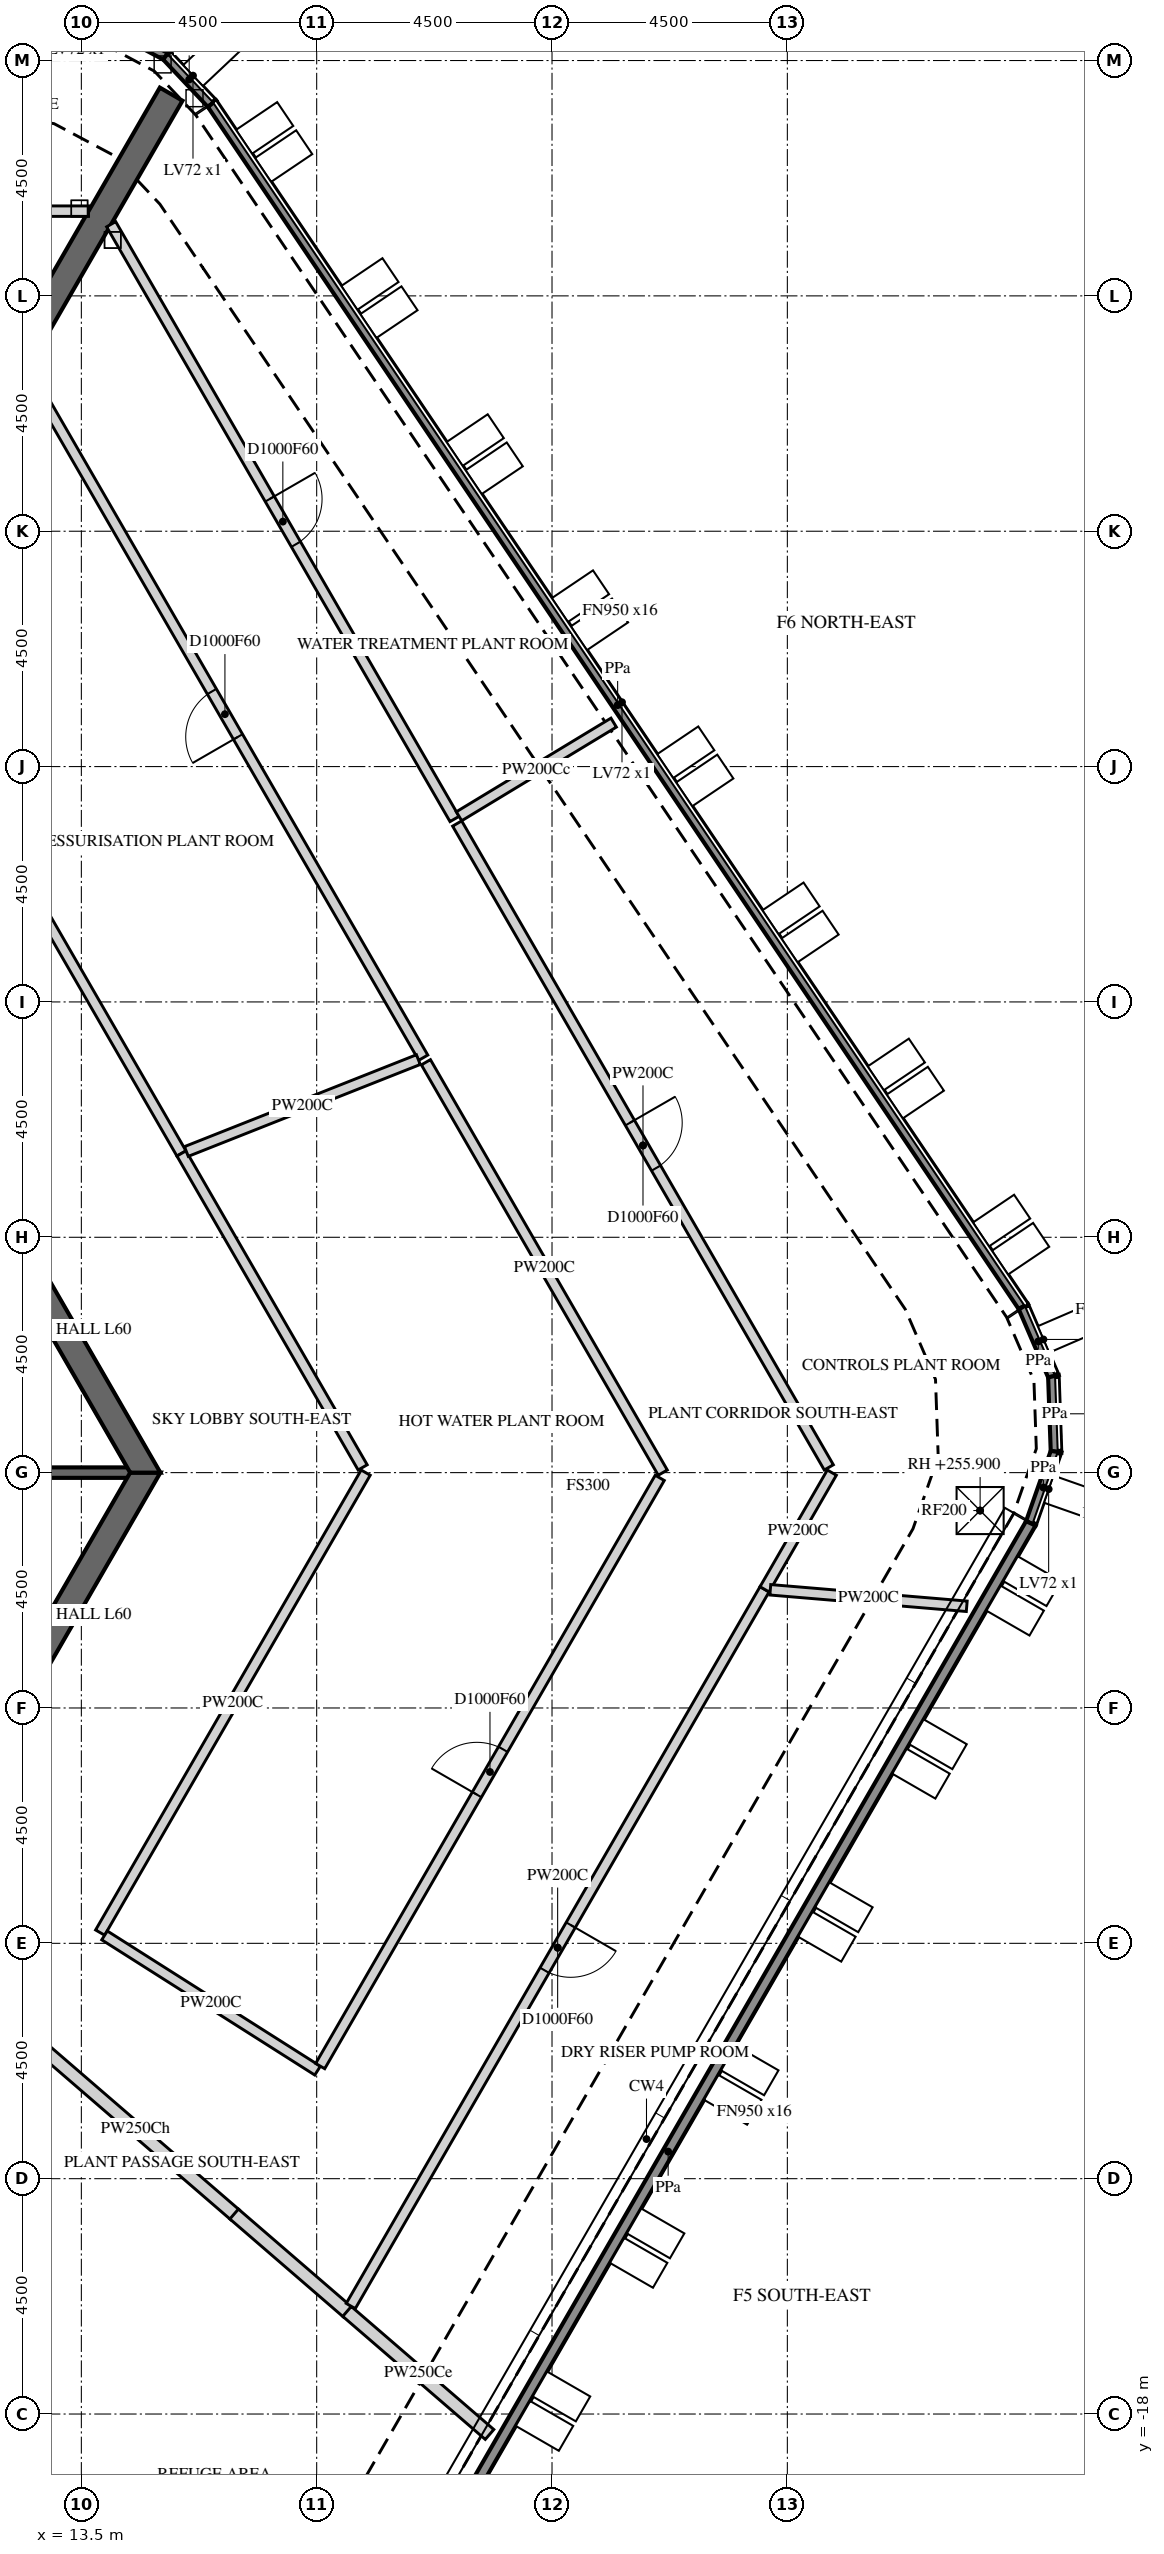
"""IFC4 building model, lengths in metres.
Left out: names, types, materials, properties, quantities, classifications, styles, units other than length and angle.
Written with IfcOpenShell. Run it as: python <this file> out.ifc"""

import sys

from ifc_helpers import new_model, si_unit, direction, frame, frame_2d, origin, origin_2d, place, context, subcontext, project, spatial, polyline, rectangle, outline, extrude, element, fill, save


model = new_model("IFC4")
c1 = context("Model", 3, precision=1e-05, world=origin(), true_north=direction((0.0, 1.0)))
c2 = subcontext(c1, "Body", "Model", "MODEL_VIEW")
j1 = project(units=[si_unit("LENGTHUNIT", "METRE"), si_unit("PLANEANGLEUNIT", "RADIAN")], contexts=[c1])
p1 = place(None, origin())
s1 = spatial("IfcSite", under=j1, at=p1, CompositionType="ELEMENT")
p2 = place(p1, origin())
s2 = spatial("IfcBuilding", under=s1, at=p2, CompositionType="ELEMENT")
p3 = place(p2, frame((0.0, 0.0, 250.2)))
s3 = spatial("IfcBuildingStorey", under=s2, at=p3, CompositionType="ELEMENT", Elevation=250.2)
p4 = place(p3, frame((14.009, 27.694, 5.7), z_axis=(0.0, 0.0, 1.0), x_axis=(0.882950708751, -0.469465702598, 0.0)))
e1 = element("IfcWall", 1, at=p4, inside=s3, PredefinedType="PARAPET", context=c2, shape_type="SweptSolid", body=[
    extrude(outline(polyline([(0.016, -0.1), (1.248, -0.1), (1.281, 0.1), (-0.016, 0.1), (0.016, -0.1)])), origin(), (0.0, 0.0, 1.0), 1.1),
])
p5 = place(p3, frame((15.125, 27.1, 5.7), z_axis=(0.0, 0.0, 1.0), x_axis=(0.686184039693, -0.727427978339, 0.0)))
e2 = element("IfcWall", 2, at=p5, inside=s3, PredefinedType="PARAPET", context=c2, shape_type="SweptSolid", body=[
    extrude(outline(polyline([(0.016, -0.1), (1.265, -0.1), (1.281, 0.1), (-0.016, 0.1), (0.016, -0.1)])), origin(), (0.0, 0.0, 1.0), 1.1),
])
p6 = place(p3, frame((15.999, 26.174, 5.7), z_axis=(0.0, 0.0, 1.0), x_axis=(0.559192735444, -0.82903768589, 0.0)))
e3 = element("IfcWall", 3, at=p6, inside=s3, PredefinedType="PARAPET", context=c2, shape_type="SweptSolid", body=[
    extrude(outline(polyline([(0.008, -0.1), (27.731, -0.1), (27.75, 0.1), (-0.008, 0.1), (0.008, -0.1)])), origin(), (0.0, 0.0, 1.0), 1.1),
])
p7 = place(p3, frame((31.511, 3.176, 5.7), z_axis=(0.0, 0.0, 1.0), x_axis=(0.396149459685, -0.918186040839, 0.0)))
e4 = element("IfcWall", 4, at=p7, inside=s3, PredefinedType="PARAPET", context=c2, shape_type="SweptSolid", body=[
    extrude(outline(polyline([(0.009, -0.1), (1.434, -0.1), (1.471, 0.1), (-0.009, 0.1), (0.009, -0.1)])), origin(), (0.0, 0.0, 1.0), 1.1),
])
p8 = place(p3, frame((32.086, 1.843, 5.7), z_axis=(0.0, 0.0, 1.0), x_axis=(0.034846799115, -0.999392665868, 0.0)))
e5 = element("IfcWall", 5, at=p8, inside=s3, PredefinedType="PARAPET", context=c2, shape_type="SweptSolid", body=[
    extrude(outline(polyline([(0.019, -0.1), (1.425, -0.1), (1.462, 0.1), (-0.019, 0.1), (0.019, -0.1)])), origin(), (0.0, 0.0, 1.0), 1.1),
])
p9 = place(p3, frame((32.137, 0.4, 5.7), z_axis=(0.0, 0.0, 1.0), x_axis=(-0.331113967916, -0.943590769482, 0.0)))
e6 = element("IfcWall", 6, at=p9, inside=s3, PredefinedType="PARAPET", context=c2, shape_type="SweptSolid", body=[
    extrude(outline(polyline([(0.019, -0.1), (1.443, -0.1), (1.462, 0.1), (-0.019, 0.1), (0.019, -0.1)])), origin(), (0.0, 0.0, 1.0), 1.1),
])
p10 = place(p3, frame((31.656, -0.97, 5.7), z_axis=(0.0, 0.0, 1.0), x_axis=(-0.499997219864, -0.866027008891, 0.0)))
e7 = element("IfcWall", 7, at=p10, inside=s3, PredefinedType="PARAPET", context=c2, shape_type="SweptSolid", body=[
    extrude(outline(polyline([(0.009, -0.1), (27.732, -0.1), (27.749, 0.1), (-0.009, 0.1), (0.009, -0.1)])), origin(), (0.0, 0.0, 1.0), 1.1),
])
p11 = place(p3, frame((7.361, -12.75, -0.3), z_axis=(0.0, 0.0, 1.0), x_axis=(0.50000571537, 0.866022103989, 0.0)))
e8 = element("IfcWall", 8, at=p11, inside=s3, PredefinedType="SHEAR", context=c2, shape_type="SweptSolid", body=[
    extrude(outline(polyline([(-0.144, -0.25), (14.867, -0.25), (14.578, 0.25), (0.144, 0.25), (-0.144, -0.25)])), origin(), (0.0, 0.0, 1.0), 5.8),
])
p12 = place(p11, frame((6.49, 0.0, 0.3)))
e9 = element("IfcOpeningElement", 9, at=p12, cuts=e8, PredefinedType="OPENING", context=c2, shape_type="SweptSolid", body=[
    extrude(rectangle(XDim=1.8, YDim=2.4, at=frame_2d((0.9, 1.2))), frame((0.0, 0.26, 0.0), z_axis=(0.0, -1.0, 0.0), x_axis=(1.0, 0.0, 0.0)), (0.0, 0.0, 1.0), 0.52),
])
p13 = place(p3, frame((14.722, 0.0, -0.3), z_axis=(0.0, 0.0, 1.0), x_axis=(-0.50000571537, 0.866022103989, 0.0)))
e10 = element("IfcWall", 10, at=p13, inside=s3, PredefinedType="SHEAR", context=c2, shape_type="SweptSolid", body=[
    extrude(outline(polyline([(-0.144, -0.25), (14.867, -0.25), (14.578, 0.25), (0.144, 0.25), (-0.144, -0.25)])), origin(), (0.0, 0.0, 1.0), 5.8),
])
p14 = place(p13, frame((6.432, 0.0, 0.3)))
e11 = element("IfcOpeningElement", 11, at=p14, cuts=e10, PredefinedType="OPENING", context=c2, shape_type="SweptSolid", body=[
    extrude(rectangle(XDim=1.8, YDim=2.4, at=frame_2d((0.9, 1.2))), frame((0.0, 0.26, 0.0), z_axis=(0.0, -1.0, 0.0), x_axis=(1.0, 0.0, 0.0)), (0.0, 0.0, 1.0), 0.52),
])
p15 = place(p3, frame((7.506, 13.0, -0.3), z_axis=(0.0, 0.0, 1.0), x_axis=(0.499988271576, 0.866032175087, 0.0)))
e12 = element("IfcWall", 12, at=p15, inside=s3, PredefinedType="SHEAR", context=c2, shape_type="SweptSolid", body=[
    extrude(rectangle(XDim=15.424, YDim=0.5, at=frame_2d((7.712, 0.0))), origin(), (0.0, 0.0, 1.0), 5.8),
])
p16 = place(p15, frame((6.812, 0.0, 0.3)))
e13 = element("IfcOpeningElement", 13, at=p16, cuts=e12, PredefinedType="OPENING", context=c2, shape_type="SweptSolid", body=[
    extrude(rectangle(XDim=1.8, YDim=2.4, at=frame_2d((0.9, 1.2))), frame((0.0, 0.26, 0.0), z_axis=(0.0, -1.0, 0.0), x_axis=(1.0, 0.0, 0.0)), (0.0, 0.0, 1.0), 0.52),
])
p17 = place(p3, frame((7.506, -13.0, -0.3), z_axis=(0.0, 0.0, 1.0), x_axis=(0.499988271576, -0.866032175087, 0.0)))
e14 = element("IfcWall", 14, at=p17, inside=s3, PredefinedType="SHEAR", context=c2, shape_type="SweptSolid", body=[
    extrude(rectangle(XDim=15.424, YDim=0.5, at=frame_2d((7.712, 0.0))), origin(), (0.0, 0.0, 1.0), 5.8),
])
p18 = place(p17, frame((6.812, 0.0, 0.3)))
e15 = element("IfcOpeningElement", 15, at=p18, cuts=e14, PredefinedType="OPENING", context=c2, shape_type="SweptSolid", body=[
    extrude(rectangle(XDim=1.8, YDim=2.4, at=frame_2d((0.9, 1.2))), frame((0.0, 0.26, 0.0), z_axis=(0.0, -1.0, 0.0), x_axis=(1.0, 0.0, 0.0)), (0.0, 0.0, 1.0), 0.52),
])
p19 = place(p3, frame((11.547, 0.0, -0.3), z_axis=(0.0, 0.0, 1.0), x_axis=(1.0, 0.0, 0.0)))
e16 = element("IfcWall", 16, at=p19, inside=s3, PredefinedType="SHEAR", context=c2, shape_type="SweptSolid", body=[
    extrude(rectangle(XDim=2.887, YDim=0.2, at=frame_2d((1.443, 0.0))), origin(), (0.0, 0.0, 1.0), 5.8),
])
p20 = place(p3, frame((20.038, 7.934, 0.0), z_axis=(0.0, 0.0, 1.0), x_axis=(-0.500056356876, 0.865992863682, 0.0)))
e17 = element("IfcWall", 17, at=p20, inside=s3, PredefinedType="PARTITIONING", context=c2, shape_type="SweptSolid", body=[
    extrude(rectangle(XDim=15.169, YDim=0.2, at=frame_2d((7.584, 0.0))), origin(), (0.0, 0.0, 1.0), 5.5),
])
p21 = place(p20, frame((7.084, 0.0, 0.0)))
e18 = element("IfcOpeningElement", 18, at=p21, cuts=e17, PredefinedType="OPENING", context=c2, shape_type="SweptSolid", body=[
    extrude(rectangle(XDim=1.0, YDim=2.1, at=frame_2d((0.5, 1.05))), frame((0.0, 0.11, 0.0), z_axis=(0.0, -1.0, 0.0), x_axis=(1.0, 0.0, 0.0)), (0.0, 0.0, 1.0), 0.22),
])
p22 = place(p3, frame((12.631, -10.903, 0.0), z_axis=(0.0, 0.0, 1.0), x_axis=(0.756924533262, -0.653502296053, 0.0)))
e19 = element("IfcWall", 19, at=p22, inside=s3, PredefinedType="PARTITIONING", context=c2, shape_type="SweptSolid", body=[
    extrude(rectangle(XDim=5.028, YDim=0.25, at=frame_2d((2.514, 0.0))), origin(), (0.0, 0.0, 1.0), 4.573),
])
p23 = place(p3, frame((7.916, 24.12, 0.0), z_axis=(0.0, 0.0, 1.0), x_axis=(1.0, 0.0, 0.0)))
e20 = element("IfcWall", 20, at=p23, inside=s3, PredefinedType="PARTITIONING", context=c2, shape_type="SweptSolid", body=[
    extrude(rectangle(XDim=5.721, YDim=0.2, at=frame_2d((2.861, 0.0))), origin(), (0.0, 0.0, 1.0), 5.5),
])
p24 = place(p23, frame((2.361, 0.0, 0.0)))
e21 = element("IfcOpeningElement", 21, at=p24, cuts=e20, PredefinedType="OPENING", context=c2, shape_type="SweptSolid", body=[
    extrude(rectangle(XDim=1.0, YDim=2.1, at=frame_2d((0.5, 1.05))), frame((0.0, 0.11, 0.0), z_axis=(0.0, -1.0, 0.0), x_axis=(1.0, 0.0, 0.0)), (0.0, 0.0, 1.0), 0.22),
])
p25 = place(p3, frame((13.859, -8.795, 0.0), z_axis=(0.0, 0.0, 1.0), x_axis=(0.500027655771, 0.866009436129, 0.0)))
e22 = element("IfcWall", 22, at=p25, inside=s3, PredefinedType="PARTITIONING", context=c2, shape_type="SweptSolid", body=[
    extrude(rectangle(XDim=10.156, YDim=0.2, at=frame_2d((5.078, 0.0))), origin(), (0.0, 0.0, 1.0), 5.5),
])
p26 = place(p3, frame((15.414, 6.103, 0.0), z_axis=(0.0, 0.0, 1.0), x_axis=(-0.50002969912, 0.86600825631, 0.0)))
e23 = element("IfcWall", 23, at=p26, inside=s3, PredefinedType="PARTITIONING", context=c2, shape_type="SweptSolid", body=[
    extrude(rectangle(XDim=11.601, YDim=0.2, at=frame_2d((5.801, 0.0))), origin(), (0.0, 0.0, 1.0), 5.5),
])
p27 = place(p3, frame((16.422, -14.176, 0.0), z_axis=(0.0, 0.0, 1.0), x_axis=(0.756922439124, -0.653504721598, 0.0)))
e24 = element("IfcWall", 24, at=p27, inside=s3, PredefinedType="PARTITIONING", context=c2, shape_type="SweptSolid", body=[
    extrude(rectangle(XDim=2.871, YDim=0.25, at=frame_2d((1.435, 0.0))), origin(), (0.0, 0.0, 1.0), 5.5),
])
p28 = place(p3, frame((18.017, -11.434, 0.0), z_axis=(0.0, 0.0, 1.0), x_axis=(-0.844296399795, 0.535876468315, 0.0)))
e25 = element("IfcWall", 25, at=p28, inside=s3, PredefinedType="PARTITIONING", context=c2, shape_type="SweptSolid", body=[
    extrude(rectangle(XDim=4.825, YDim=0.2, at=frame_2d((2.412, 0.0))), origin(), (0.0, 0.0, 1.0), 5.5),
])
p29 = place(p3, frame((18.58, -16.038, 0.0), z_axis=(0.0, 0.0, 1.0), x_axis=(0.756983085106, -0.653434471744, 0.0)))
e26 = element("IfcWall", 26, at=p29, inside=s3, PredefinedType="PARTITIONING", context=c2, shape_type="SweptSolid", body=[
    extrude(rectangle(XDim=3.6, YDim=0.25, at=frame_2d((1.8, 0.0))), origin(), (0.0, 0.0, 1.0), 5.5),
])
p30 = place(p3, frame((26.564, -2.231, 0.0), z_axis=(0.0, 0.0, 1.0), x_axis=(-0.500020273296, -0.866013698675, 0.0)))
e27 = element("IfcWall", 27, at=p30, inside=s3, PredefinedType="PARTITIONING", context=c2, shape_type="SweptSolid", body=[
    extrude(rectangle(XDim=15.824, YDim=0.2, at=frame_2d((7.912, 0.0))), origin(), (0.0, 0.0, 1.0), 5.5),
])
p31 = place(p30, frame((7.412, 0.0, 0.0)))
e28 = element("IfcOpeningElement", 28, at=p31, cuts=e27, PredefinedType="OPENING", context=c2, shape_type="SweptSolid", body=[
    extrude(rectangle(XDim=1.0, YDim=2.1, at=frame_2d((0.5, 1.05))), frame((0.0, 0.11, 0.0), z_axis=(0.0, -1.0, 0.0), x_axis=(1.0, 0.0, 0.0)), (0.0, 0.0, 1.0), 0.22),
])
p32 = place(p3, frame((18.879, 0.1, 0.0), z_axis=(0.0, 0.0, 1.0), x_axis=(-0.499923693419, 0.866069454927, 0.0)))
e29 = element("IfcWall", 29, at=p32, inside=s3, PredefinedType="PARTITIONING", context=c2, shape_type="SweptSolid", body=[
    extrude(rectangle(XDim=6.931, YDim=0.2, at=frame_2d((3.466, 0.0))), origin(), (0.0, 0.0, 1.0), 5.5),
])
p33 = place(p3, frame((19.944, 7.897, 0.0), z_axis=(0.0, 0.0, 1.0), x_axis=(-0.929759179484, -0.368168260671, 0.0)))
e30 = element("IfcWall", 30, at=p33, inside=s3, PredefinedType="PARTITIONING", context=c2, shape_type="SweptSolid", body=[
    extrude(rectangle(XDim=4.771, YDim=0.2, at=frame_2d((2.386, 0.0))), origin(), (0.0, 0.0, 1.0), 5.5),
])
p34 = place(p3, frame((20.089, 7.846, 0.0), z_axis=(0.0, 0.0, 1.0), x_axis=(0.499930063508, -0.866065777872, 0.0)))
e31 = element("IfcWall", 31, at=p34, inside=s3, PredefinedType="PARTITIONING", context=c2, shape_type="SweptSolid", body=[
    extrude(rectangle(XDim=9.06, YDim=0.2, at=frame_2d((4.53, 0.0))), origin(), (0.0, 0.0, 1.0), 5.5),
])
p35 = place(p3, frame((14.07, 23.87, 0.0), z_axis=(0.0, 0.0, 1.0), x_axis=(0.500014285048, -0.866017156151, 0.0)))
e32 = element("IfcWall", 32, at=p35, inside=s3, PredefinedType="PARTITIONING", context=c2, shape_type="SweptSolid", body=[
    extrude(rectangle(XDim=13.131, YDim=0.2, at=frame_2d((6.566, 0.0))), origin(), (0.0, 0.0, 1.0), 5.5),
])
p36 = place(p35, frame((6.066, 0.0, 0.0)))
e33 = element("IfcOpeningElement", 33, at=p36, cuts=e32, PredefinedType="OPENING", context=c2, shape_type="SweptSolid", body=[
    extrude(rectangle(XDim=1.0, YDim=2.1, at=frame_2d((0.5, 1.05))), frame((0.0, 0.11, 0.0), z_axis=(0.0, -1.0, 0.0), x_axis=(1.0, 0.0, 0.0)), (0.0, 0.0, 1.0), 0.22),
])
p37 = place(p3, frame((23.679, 14.341, 0.0), z_axis=(0.0, 0.0, 1.0), x_axis=(-0.855411164344, -0.517949553447, 0.0)))
e34 = element("IfcWall", 34, at=p37, inside=s3, PredefinedType="PARTITIONING", context=c2, shape_type="SweptSolid", body=[
    extrude(rectangle(XDim=3.458, YDim=0.2, at=frame_2d((1.729, 0.0))), origin(), (0.0, 0.0, 1.0), 4.573),
])
p38 = place(p3, frame((18.067, -11.347, 0.0), z_axis=(0.0, 0.0, 1.0), x_axis=(0.49997251285, 0.866041272916, 0.0)))
e35 = element("IfcWall", 35, at=p38, inside=s3, PredefinedType="PARTITIONING", context=c2, shape_type="SweptSolid", body=[
    extrude(rectangle(XDim=12.987, YDim=0.2, at=frame_2d((6.494, 0.0))), origin(), (0.0, 0.0, 1.0), 5.5),
])
p39 = place(p38, frame((5.994, 0.0, 0.0)))
e36 = element("IfcOpeningElement", 36, at=p39, cuts=e35, PredefinedType="OPENING", context=c2, shape_type="SweptSolid", body=[
    extrude(rectangle(XDim=1.0, YDim=2.1, at=frame_2d((0.5, 1.05))), frame((0.0, 0.11, 0.0), z_axis=(0.0, -1.0, 0.0), x_axis=(1.0, 0.0, 0.0)), (0.0, 0.0, 1.0), 0.22),
])
p40 = place(p3, frame((26.564, -2.231, 0.0), z_axis=(0.0, 0.0, 1.0), x_axis=(0.499727924102, 0.866182429903, 0.0)))
e37 = element("IfcWall", 37, at=p40, inside=s3, PredefinedType="PARTITIONING", context=c2, shape_type="SweptSolid", body=[
    extrude(rectangle(XDim=2.576, YDim=0.2, at=frame_2d((1.288, 0.0))), origin(), (0.0, 0.0, 1.0), 5.5),
])
p41 = place(p3, frame((20.686, 12.411, 0.0), z_axis=(0.0, 0.0, 1.0), x_axis=(0.499960816026, -0.86604802548, 0.0)))
e38 = element("IfcWall", 38, at=p41, inside=s3, PredefinedType="PARTITIONING", context=c2, shape_type="SweptSolid", body=[
    extrude(rectangle(XDim=14.216, YDim=0.2, at=frame_2d((7.108, 0.0))), origin(), (0.0, 0.0, 1.0), 5.5),
])
p42 = place(p41, frame((6.608, 0.0, 0.0)))
e39 = element("IfcOpeningElement", 39, at=p42, cuts=e38, PredefinedType="OPENING", context=c2, shape_type="SweptSolid", body=[
    extrude(rectangle(XDim=1.0, YDim=2.1, at=frame_2d((0.5, 1.05))), frame((0.0, 0.11, 0.0), z_axis=(0.0, -1.0, 0.0), x_axis=(1.0, 0.0, 0.0)), (0.0, 0.0, 1.0), 0.22),
])
p43 = place(p3, frame((30.43, -2.556, 0.0), z_axis=(0.0, 0.0, 1.0), x_axis=(-0.996492851247, 0.083677938633, 0.0)))
e40 = element("IfcWall", 40, at=p43, inside=s3, PredefinedType="PARTITIONING", context=c2, shape_type="SweptSolid", body=[
    extrude(rectangle(XDim=3.77, YDim=0.2, at=frame_2d((1.885, 0.0))), origin(), (0.0, 0.0, 1.0), 5.5),
])
p44 = place(p3, frame((0.0, 0.0, 5.5)))
p45 = place(p44, frame((30.686, -0.725, 0.0)))
p46 = place(p45, frame((0.0, 0.0, 0.15)))
e41 = element("IfcDoor", 41, at=p46, inside=s3, OperationType="SINGLE_SWING_LEFT", PredefinedType="TRAPDOOR", context=c2, shape_type="SweptSolid", body=[
    extrude(rectangle(XDim=0.9, YDim=0.9, at=origin_2d()), origin(), (0.0, 0.0, 1.0), 0.05),
])
p47 = place(p21, origin())
e42 = element("IfcDoor", 42, at=p47, inside=s3, OperationType="SINGLE_SWING_LEFT", PredefinedType="DOOR", context=c2, shape_type="SweptSolid", body=[
    extrude(rectangle(XDim=1.0, YDim=2.1, at=frame_2d((0.5, 1.05))), frame((0.0, 0.025, 0.0), z_axis=(0.0, -1.0, 0.0), x_axis=(1.0, 0.0, 0.0)), (0.0, 0.0, 1.0), 0.05),
])
fill(e18, e42)
p48 = place(p31, origin())
e43 = element("IfcDoor", 43, at=p48, inside=s3, OperationType="SINGLE_SWING_LEFT", PredefinedType="DOOR", context=c2, shape_type="SweptSolid", body=[
    extrude(rectangle(XDim=1.0, YDim=2.1, at=frame_2d((0.5, 1.05))), frame((0.0, 0.025, 0.0), z_axis=(0.0, -1.0, 0.0), x_axis=(1.0, 0.0, 0.0)), (0.0, 0.0, 1.0), 0.05),
])
fill(e28, e43)
p49 = place(p36, origin())
e44 = element("IfcDoor", 44, at=p49, inside=s3, OperationType="SINGLE_SWING_RIGHT", PredefinedType="DOOR", context=c2, shape_type="SweptSolid", body=[
    extrude(rectangle(XDim=1.0, YDim=2.1, at=frame_2d((0.5, 1.05))), frame((0.0, 0.025, 0.0), z_axis=(0.0, -1.0, 0.0), x_axis=(1.0, 0.0, 0.0)), (0.0, 0.0, 1.0), 0.05),
])
fill(e33, e44)
p50 = place(p39, origin())
e45 = element("IfcDoor", 45, at=p50, inside=s3, OperationType="SINGLE_SWING_LEFT", PredefinedType="DOOR", context=c2, shape_type="SweptSolid", body=[
    extrude(rectangle(XDim=1.0, YDim=2.1, at=frame_2d((0.5, 1.05))), frame((0.0, 0.025, 0.0), z_axis=(0.0, -1.0, 0.0), x_axis=(1.0, 0.0, 0.0)), (0.0, 0.0, 1.0), 0.05),
])
fill(e36, e45)
p51 = place(p42, origin())
e46 = element("IfcDoor", 46, at=p51, inside=s3, OperationType="SINGLE_SWING_RIGHT", PredefinedType="DOOR", context=c2, shape_type="SweptSolid", body=[
    extrude(rectangle(XDim=1.0, YDim=2.1, at=frame_2d((0.5, 1.05))), frame((0.0, 0.025, 0.0), z_axis=(0.0, -1.0, 0.0), x_axis=(1.0, 0.0, 0.0)), (0.0, 0.0, 1.0), 0.05),
])
fill(e39, e46)
save(model, sys.argv[1])
